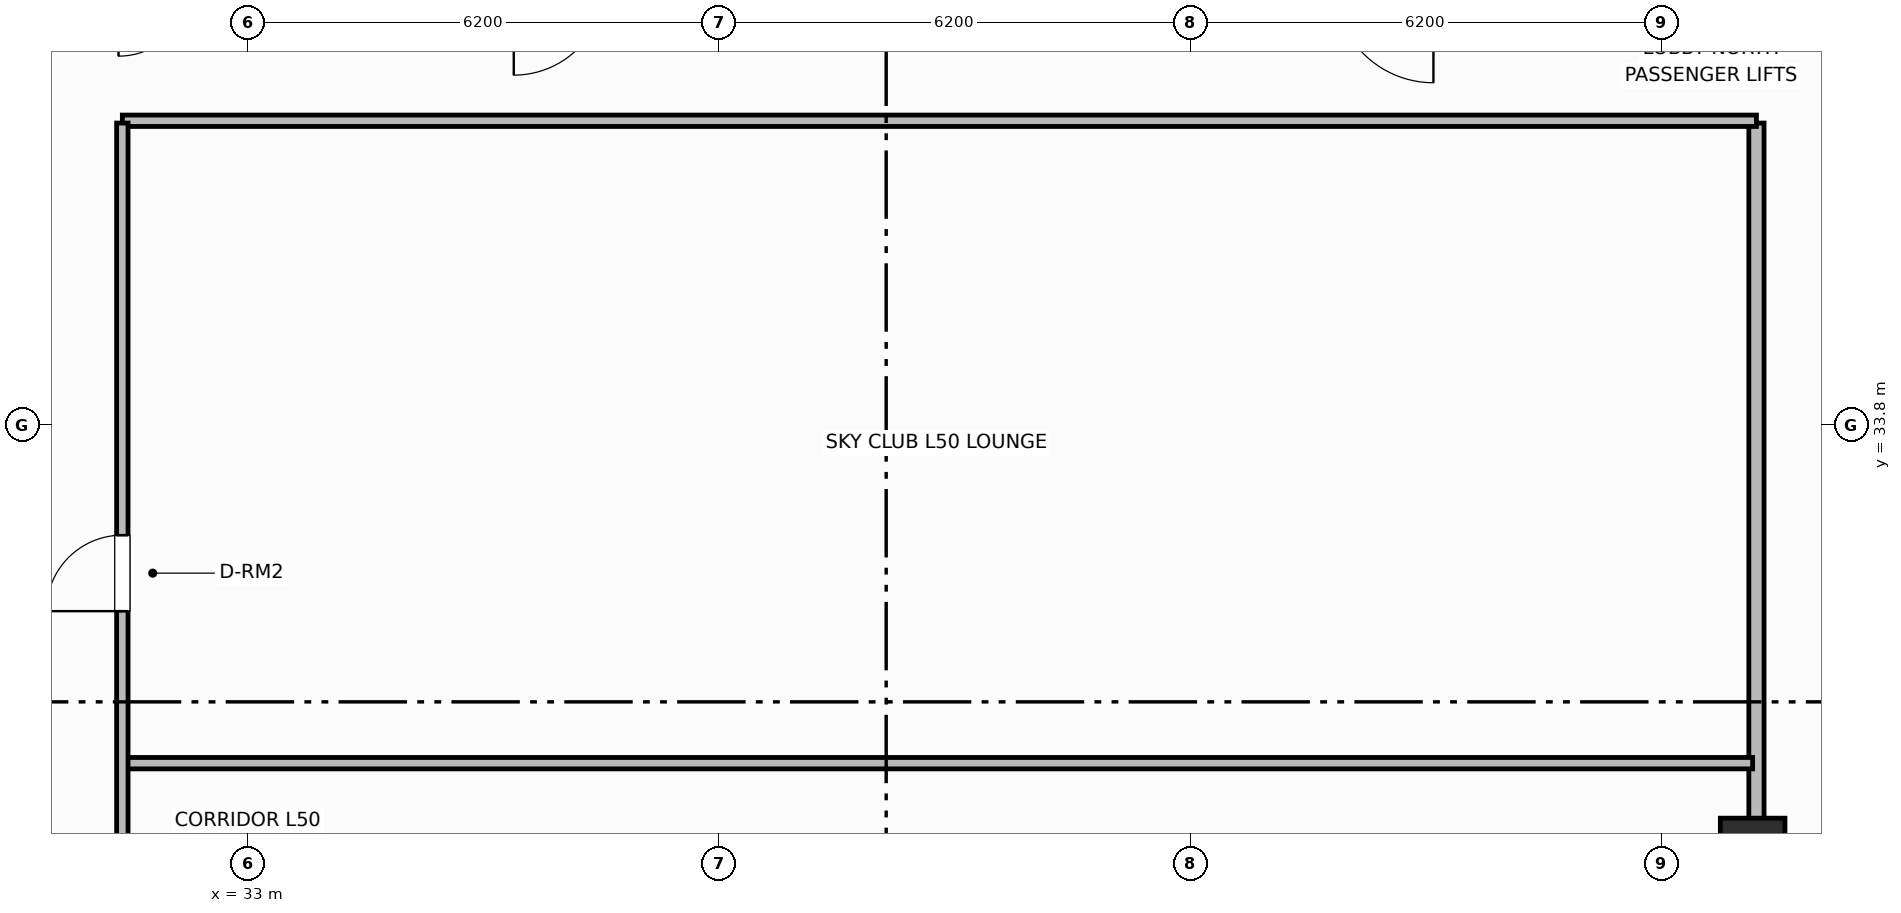
"""IFC4 building model, lengths in metres.
Left out: names, types, materials, properties, quantities, classifications, styles, units other than length and angle.
Written with IfcOpenShell. Run it as: python <this file> out.ifc"""

import sys

from ifc_helpers import new_model, si_unit, direction, frame, frame_2d, origin, origin_2d, place, context, subcontext, project, spatial, rectangle, extrude, element, fill, save


model = new_model("IFC4")
c1 = context("Model", 3, precision=1e-05, world=origin(), true_north=direction((0.0, 1.0)))
c2 = subcontext(c1, "Body", "Model", "MODEL_VIEW")
j1 = project(units=[si_unit("LENGTHUNIT", "METRE"), si_unit("PLANEANGLEUNIT", "RADIAN")], contexts=[c1])
p1 = place(None, origin())
s1 = spatial("IfcSite", under=j1, at=p1, CompositionType="ELEMENT")
p2 = place(p1, origin())
s2 = spatial("IfcBuilding", under=s1, at=p2, CompositionType="ELEMENT")
p3 = place(p2, frame((0.0, 0.0, 203.1)))
s3 = spatial("IfcBuildingStorey", under=s2, at=p3, CompositionType="ELEMENT", Elevation=203.1)
p4 = place(p3, frame((52.8, 28.2, 0.0), z_axis=(0.0, 0.0, 1.0), x_axis=(1.0, 0.0, 0.0)))
e1 = element("IfcColumn", 1, at=p4, inside=s3, PredefinedType="COLUMN", context=c2, shape_type="SweptSolid", body=[
    extrude(rectangle(XDim=0.85, YDim=0.85, at=origin_2d()), origin(), (0.0, 0.0, 1.0), 4.2),
])
p5 = place(p3, frame((52.85, 18.63, 0.0), z_axis=(0.0, 0.0, 1.0), x_axis=(0.0, 1.0, 0.0)))
e2 = element("IfcWall", 2, at=p5, inside=s3, PredefinedType="PARTITIONING", context=c2, shape_type="SweptSolid", body=[
    extrude(rectangle(XDim=19.14, YDim=0.2, at=frame_2d((9.57, 0.0))), origin(), (0.0, 0.0, 1.0), 3.05),
])
p6 = place(p3, frame((31.35, 37.8, 0.0), z_axis=(0.0, 0.0, 1.0), x_axis=(1.0, 0.0, 0.0)))
e3 = element("IfcWall", 3, at=p6, inside=s3, PredefinedType="PARTITIONING", context=c2, shape_type="SweptSolid", body=[
    extrude(rectangle(XDim=21.5, YDim=0.15, at=frame_2d((10.75, 0.0))), origin(), (0.0, 0.0, 1.0), 3.05),
])
p7 = place(p3, frame((31.38, 29.348, 0.0), z_axis=(0.0, 0.0, 1.0), x_axis=(1.0, 0.0, 0.0)))
e4 = element("IfcWall", 4, at=p7, inside=s3, PredefinedType="PARTITIONING", context=c2, shape_type="SweptSolid", body=[
    extrude(rectangle(XDim=21.42, YDim=0.15, at=frame_2d((10.71, 0.0))), origin(), (0.0, 0.0, 1.0), 3.05),
])
p8 = place(p3, frame((31.35, 18.63, 0.0), z_axis=(0.0, 0.0, 1.0), x_axis=(0.0, 1.0, 0.0)))
e5 = element("IfcWall", 5, at=p8, inside=s3, PredefinedType="PARTITIONING", context=c2, shape_type="SweptSolid", body=[
    extrude(rectangle(XDim=19.14, YDim=0.15, at=frame_2d((9.57, 0.0))), origin(), (0.0, 0.0, 1.0), 3.05),
])
p9 = place(p8, frame((2.4, 0.0, 0.0)))
e6 = element("IfcOpeningElement", 6, at=p9, cuts=e5, PredefinedType="OPENING", context=c2, shape_type="SweptSolid", body=[
    extrude(rectangle(XDim=1.3, YDim=2.2, at=frame_2d((0.65, 1.1))), frame((0.0, 0.085, 0.0), z_axis=(0.0, -1.0, 0.0), x_axis=(1.0, 0.0, 0.0)), (0.0, 0.0, 1.0), 0.17),
])
p10 = place(p8, frame((12.719, 0.0, 0.0)))
e7 = element("IfcOpeningElement", 7, at=p10, cuts=e5, PredefinedType="OPENING", context=c2, shape_type="SweptSolid", body=[
    extrude(rectangle(XDim=1.0, YDim=2.15, at=frame_2d((0.5, 1.075))), frame((0.0, 0.085, 0.0), z_axis=(0.0, -1.0, 0.0), x_axis=(1.0, 0.0, 0.0)), (0.0, 0.0, 1.0), 0.17),
])
p11 = place(p10, origin())
e8 = element("IfcDoor", 8, at=p11, inside=s3, OperationType="SINGLE_SWING_LEFT", PredefinedType="DOOR", context=c2, shape_type="SweptSolid", body=[
    extrude(rectangle(XDim=1.0, YDim=2.15, at=frame_2d((0.5, 1.075))), frame((0.0, 0.025, 0.0), z_axis=(0.0, -1.0, 0.0), x_axis=(1.0, 0.0, 0.0)), (0.0, 0.0, 1.0), 0.05),
])
fill(e7, e8)
save(model, sys.argv[1])
